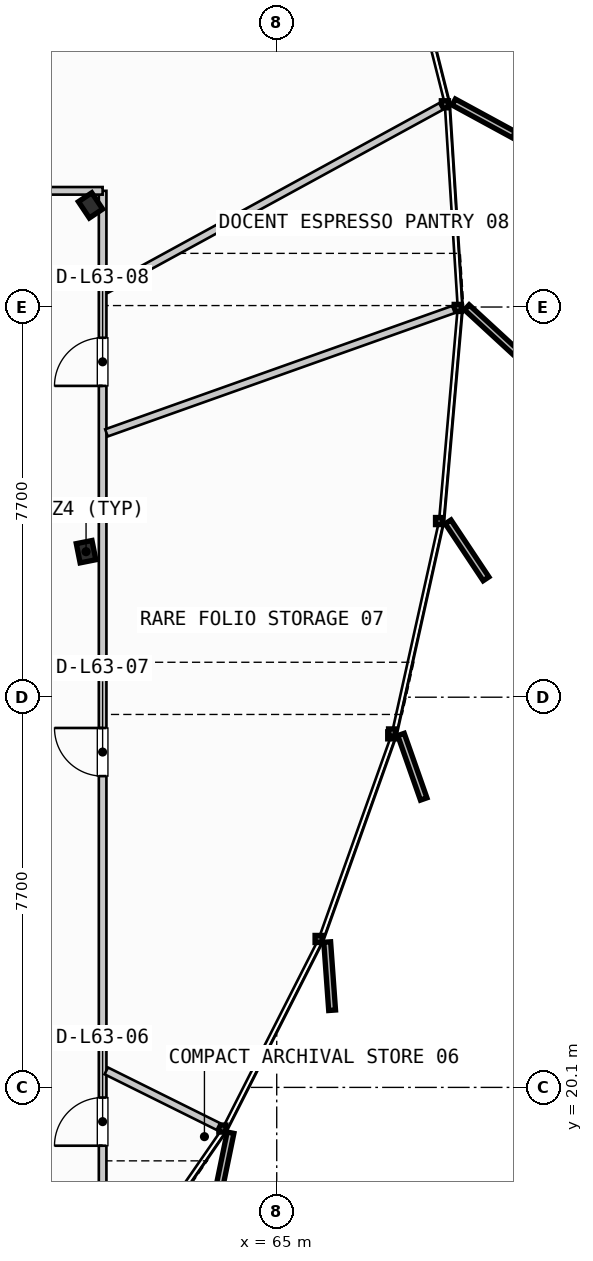
"""IFC4 building model, lengths in metres.
Left out: names, types, materials, properties, quantities, classifications, styles, units other than length and angle.
Written with IfcOpenShell. Run it as: python <this file> out.ifc"""

import sys

from ifc_helpers import new_model, si_unit, direction, frame, frame_2d, origin, origin_2d, place, context, subcontext, project, spatial, rectangle, i_section, extrude, source, transform, mapped, element, fill, save


model = new_model("IFC4")
c1 = context("Model", 3, precision=1e-05, world=origin(), true_north=direction((0.0, 1.0)))
c2 = subcontext(c1, "Body", "Model", "MODEL_VIEW")
j1 = project(units=[si_unit("LENGTHUNIT", "METRE"), si_unit("PLANEANGLEUNIT", "RADIAN")], contexts=[c1])
p1 = place(None, origin())
s1 = spatial("IfcSite", under=j1, at=p1, CompositionType="ELEMENT")
p2 = place(p1, origin())
s2 = spatial("IfcBuilding", under=s1, at=p2, CompositionType="ELEMENT")
p3 = place(p2, frame((0.0, 0.0, 242.2)))
s3 = spatial("IfcBuildingStorey", under=s2, at=p3, CompositionType="ELEMENT", Elevation=242.2)
m1 = source(origin(), c2, "Body", "SweptSolid", [
    extrude(i_section(OverallWidth=0.387, OverallDepth=0.316, WebThickness=0.019, FlangeThickness=0.028, FilletRadius=0.015, at=origin_2d()), origin(), (0.0, 0.0, 1.0), 3.21),
])
for number, where, z_axis, x_axis in (
    (1, (61.237, 30.672, 0.0), (0.0, 0.0, 1.0), (0.981, 0.195, 0.0)),
    (2, (61.326, 37.506, 0.0), (0.0, 0.0, 1.0), (0.831, 0.556, 0.0)),
):
    element("IfcColumn", number, at=place(p3, frame(where, z_axis=z_axis, x_axis=x_axis)), inside=s3, PredefinedType="COLUMN", context=c2, shape_type="MappedRepresentation", body=[
        mapped(m1, transform((0.0, 0.0, 0.0), scale=1.0)),
    ])
p4 = place(p3, frame((61.564, 17.807, 0.0), z_axis=(0.0, 0.0, 1.0), x_axis=(0.0, 1.0, 0.0)))
e3 = element("IfcWall", 3, at=p4, inside=s3, PredefinedType="PARTITIONING", context=c2, shape_type="SweptSolid", body=[
    extrude(rectangle(XDim=19.986, YDim=0.15, at=frame_2d((9.993, 0.0))), origin(), (0.0, 0.0, 1.0), 2.28),
])
p5 = place(p4, frame((1.142, 0.0, 0.0)))
e4 = element("IfcOpeningElement", 4, at=p5, cuts=e3, PredefinedType="OPENING", context=c2, shape_type="SweptSolid", body=[
    extrude(rectangle(XDim=0.95, YDim=2.15, at=frame_2d((0.475, 1.075))), frame((0.0, 0.085, 0.0), z_axis=(0.0, -1.0, 0.0), x_axis=(1.0, 0.0, 0.0)), (0.0, 0.0, 1.0), 0.17),
])
p6 = place(p4, frame((8.436, 0.0, 0.0)))
e5 = element("IfcOpeningElement", 5, at=p6, cuts=e3, PredefinedType="OPENING", context=c2, shape_type="SweptSolid", body=[
    extrude(rectangle(XDim=0.95, YDim=2.15, at=frame_2d((0.475, 1.075))), frame((0.0, 0.085, 0.0), z_axis=(0.0, -1.0, 0.0), x_axis=(1.0, 0.0, 0.0)), (0.0, 0.0, 1.0), 0.17),
])
p7 = place(p4, frame((16.137, 0.0, 0.0)))
e6 = element("IfcOpeningElement", 6, at=p7, cuts=e3, PredefinedType="OPENING", context=c2, shape_type="SweptSolid", body=[
    extrude(rectangle(XDim=0.95, YDim=2.15, at=frame_2d((0.475, 1.075))), frame((0.0, 0.085, 0.0), z_axis=(0.0, -1.0, 0.0), x_axis=(1.0, 0.0, 0.0)), (0.0, 0.0, 1.0), 0.17),
])
p8 = place(p3, frame((61.564, 37.793, 0.0), z_axis=(0.0, 0.0, 1.0), x_axis=(-1.0, 0.0, 0.0)))
e7 = element("IfcWall", 7, at=p8, inside=s3, PredefinedType="PARTITIONING", context=c2, shape_type="SweptSolid", body=[
    extrude(rectangle(XDim=30.274, YDim=0.15, at=frame_2d((15.137, 0.0))), origin(), (0.0, 0.0, 1.0), 2.28),
])
p9 = place(p8, frame((4.968, 0.0, 0.0)))
e8 = element("IfcOpeningElement", 8, at=p9, cuts=e7, PredefinedType="OPENING", context=c2, shape_type="SweptSolid", body=[
    extrude(rectangle(XDim=0.95, YDim=2.15, at=frame_2d((0.475, 1.075))), frame((0.0, 0.085, 0.0), z_axis=(0.0, -1.0, 0.0), x_axis=(1.0, 0.0, 0.0)), (0.0, 0.0, 1.0), 0.17),
])
p10 = place(p8, frame((14.577, 0.0, 0.0)))
e9 = element("IfcOpeningElement", 9, at=p10, cuts=e7, PredefinedType="OPENING", context=c2, shape_type="SweptSolid", body=[
    extrude(rectangle(XDim=0.95, YDim=2.15, at=frame_2d((0.475, 1.075))), frame((0.0, 0.085, 0.0), z_axis=(0.0, -1.0, 0.0), x_axis=(1.0, 0.0, 0.0)), (0.0, 0.0, 1.0), 0.17),
])
p11 = place(p8, frame((23.123, 0.0, 0.0)))
e10 = element("IfcOpeningElement", 10, at=p11, cuts=e7, PredefinedType="OPENING", context=c2, shape_type="SweptSolid", body=[
    extrude(rectangle(XDim=0.95, YDim=2.15, at=frame_2d((0.475, 1.075))), frame((0.0, 0.085, 0.0), z_axis=(0.0, -1.0, 0.0), x_axis=(1.0, 0.0, 0.0)), (0.0, 0.0, 1.0), 0.17),
])
p12 = place(p3, frame((61.635, 20.426, 0.0), z_axis=(0.0, 0.0, 1.0), x_axis=(0.895649664902, -0.444760247505, 0.0)))
e11 = element("IfcWall", 11, at=p12, inside=s3, PredefinedType="PARTITIONING", context=c2, shape_type="SweptSolid", body=[
    extrude(rectangle(XDim=2.47, YDim=0.15, at=frame_2d((1.235, 0.0))), origin(), (0.0, 0.0, 1.0), 2.28),
])
p13 = place(p3, frame((61.639, 33.017, 0.0), z_axis=(0.0, 0.0, 1.0), x_axis=(0.942197017818, 0.335059367299, 0.0)))
e12 = element("IfcWall", 12, at=p13, inside=s3, PredefinedType="PARTITIONING", context=c2, shape_type="SweptSolid", body=[
    extrude(rectangle(XDim=7.268, YDim=0.15, at=frame_2d((3.634, 0.0))), origin(), (0.0, 0.0, 1.0), 2.28),
])
p14 = place(p3, frame((61.634, 35.847, 0.0), z_axis=(0.0, 0.0, 1.0), x_axis=(0.877463915814, 0.479642654947, 0.0)))
e13 = element("IfcWall", 13, at=p14, inside=s3, PredefinedType="PARTITIONING", context=c2, shape_type="SweptSolid", body=[
    extrude(rectangle(XDim=7.528, YDim=0.15, at=frame_2d((3.764, 0.0))), origin(), (0.0, 0.0, 1.0), 2.28),
])
m2 = source(origin(), c2, "Body", "SweptSolid", [
    extrude(rectangle(XDim=0.95, YDim=2.15, at=frame_2d((0.475, 1.075))), frame((0.0, 0.025, 0.0), z_axis=(0.0, -1.0, 0.0), x_axis=(1.0, 0.0, 0.0)), (0.0, 0.0, 1.0), 0.05),
])
p15 = place(p5, origin())
e14 = element("IfcDoor", 14, at=p15, inside=s3, OperationType="SINGLE_SWING_LEFT", PredefinedType="DOOR", context=c2, shape_type="MappedRepresentation", body=[
    mapped(m2, transform((0.0, 0.0, 0.0), scale=1.0)),
])
fill(e4, e14)
p16 = place(p6, origin())
e15 = element("IfcDoor", 15, at=p16, inside=s3, OperationType="SINGLE_SWING_RIGHT", PredefinedType="DOOR", context=c2, shape_type="MappedRepresentation", body=[
    mapped(m2, transform((0.0, 0.0, 0.0), scale=1.0)),
])
fill(e5, e15)
p17 = place(p7, origin())
e16 = element("IfcDoor", 16, at=p17, inside=s3, OperationType="SINGLE_SWING_LEFT", PredefinedType="DOOR", context=c2, shape_type="MappedRepresentation", body=[
    mapped(m2, transform((0.0, 0.0, 0.0), scale=1.0)),
])
fill(e6, e16)
save(model, sys.argv[1])
